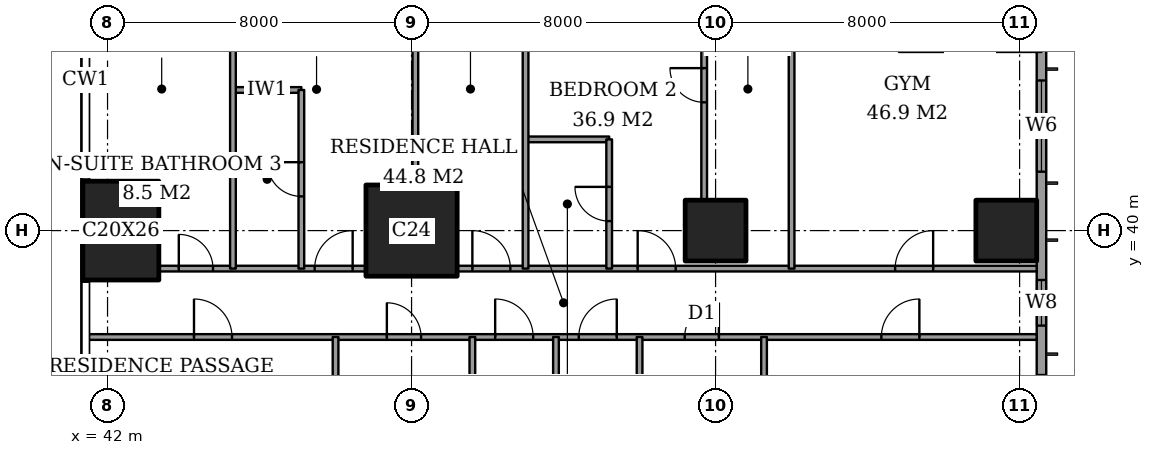
"""IFC4 building model, lengths in metres.
Left out: names, types, materials, properties, quantities, classifications, styles, units other than length and angle.
Written with IfcOpenShell. Run it as: python <this file> out.ifc"""

import sys

from ifc_helpers import new_model, si_unit, direction, frame, frame_2d, origin, origin_2d, place, context, subcontext, project, spatial, rectangle, extrude, element, fill, save


model = new_model("IFC4")
c1 = context("Model", 3, precision=1e-05, world=origin(), true_north=direction((0.0, 1.0)))
c2 = subcontext(c1, "Body", "Model", "MODEL_VIEW")
j1 = project(units=[si_unit("LENGTHUNIT", "METRE"), si_unit("PLANEANGLEUNIT", "RADIAN")], contexts=[c1])
p1 = place(None, origin())
s1 = spatial("IfcSite", under=j1, at=p1, CompositionType="ELEMENT")
p2 = place(p1, origin())
s2 = spatial("IfcBuilding", under=s1, at=p2, CompositionType="ELEMENT")
p3 = place(p2, frame((0.0, 0.0, 266.4)))
s3 = spatial("IfcBuildingStorey", under=s2, at=p3, CompositionType="ELEMENT", Elevation=266.4)
p4 = place(p3, frame((42.35, 40.0, 0.0), z_axis=(0.0, 0.0, 1.0), x_axis=(1.0, 0.0, 0.0)))
e1 = element("IfcColumn", 1, at=p4, inside=s3, PredefinedType="COLUMN", context=c2, shape_type="SweptSolid", body=[
    extrude(rectangle(XDim=2.0, YDim=2.6, at=origin_2d()), origin(), (0.0, 0.0, 1.0), 3.6),
])
p5 = place(p3, frame((50.0, 40.0, 0.0), z_axis=(0.0, 0.0, 1.0), x_axis=(1.0, 0.0, 0.0)))
e2 = element("IfcColumn", 2, at=p5, inside=s3, PredefinedType="COLUMN", context=c2, shape_type="SweptSolid", body=[
    extrude(rectangle(XDim=2.4, YDim=2.4, at=origin_2d()), origin(), (0.0, 0.0, 1.0), 3.6),
])
for number, where, z_axis, x_axis in (
    (3, (58.0, 40.0, 0.0), (0.0, 0.0, 1.0), (1.0, 0.0, 0.0)),
    (4, (65.65, 40.0, 0.0), (0.0, 0.0, 1.0), (1.0, 0.0, 0.0)),
):
    element("IfcColumn", number, at=place(p3, frame(where, z_axis=z_axis, x_axis=x_axis)), inside=s3, PredefinedType="COLUMN", context=c2, shape_type="SweptSolid", body=[
        extrude(rectangle(XDim=1.6, YDim=1.6, at=origin_2d()), origin(), (0.0, 0.0, 1.0), 3.6),
    ])
p6 = place(p3, frame((66.575, 3.175, 0.0), z_axis=(0.0, 0.0, 1.0), x_axis=(0.0, 1.0, 0.0)))
e5 = element("IfcWall", 5, at=p6, inside=s3, PredefinedType="SOLIDWALL", context=c2, shape_type="SweptSolid", body=[
    extrude(rectangle(XDim=41.65, YDim=0.25, at=frame_2d((20.825, 0.0))), origin(), (0.0, 0.0, 1.0), 3.6),
])
p7 = place(p6, frame((0.875, 0.0, 0.6)))
e6 = element("IfcOpeningElement", 6, at=p7, cuts=e5, PredefinedType="OPENING", context=c2, shape_type="SweptSolid", body=[
    extrude(rectangle(XDim=2.4, YDim=2.0, at=frame_2d((1.2, 1.0))), frame((0.0, 0.135, 0.0), z_axis=(0.0, -1.0, 0.0), x_axis=(1.0, 0.0, 0.0)), (0.0, 0.0, 1.0), 0.27),
])
p8 = place(p6, frame((6.0, 0.0, 0.6)))
e7 = element("IfcOpeningElement", 7, at=p8, cuts=e5, PredefinedType="OPENING", context=c2, shape_type="SweptSolid", body=[
    extrude(rectangle(XDim=1.2, YDim=2.0, at=frame_2d((0.6, 1.0))), frame((0.0, 0.135, 0.0), z_axis=(0.0, -1.0, 0.0), x_axis=(1.0, 0.0, 0.0)), (0.0, 0.0, 1.0), 0.27),
])
p9 = place(p6, frame((8.525, 0.0, 0.6)))
e8 = element("IfcOpeningElement", 8, at=p9, cuts=e5, PredefinedType="OPENING", context=c2, shape_type="SweptSolid", body=[
    extrude(rectangle(XDim=2.4, YDim=2.0, at=frame_2d((1.2, 1.0))), frame((0.0, 0.135, 0.0), z_axis=(0.0, -1.0, 0.0), x_axis=(1.0, 0.0, 0.0)), (0.0, 0.0, 1.0), 0.27),
])
p10 = place(p6, frame((15.625, 0.0, 0.6)))
e9 = element("IfcOpeningElement", 9, at=p10, cuts=e5, PredefinedType="OPENING", context=c2, shape_type="SweptSolid", body=[
    extrude(rectangle(XDim=2.4, YDim=2.0, at=frame_2d((1.2, 1.0))), frame((0.0, 0.135, 0.0), z_axis=(0.0, -1.0, 0.0), x_axis=(1.0, 0.0, 0.0)), (0.0, 0.0, 1.0), 0.27),
])
p11 = place(p6, frame((23.525, 0.0, 0.6)))
e10 = element("IfcOpeningElement", 10, at=p11, cuts=e5, PredefinedType="OPENING", context=c2, shape_type="SweptSolid", body=[
    extrude(rectangle(XDim=2.4, YDim=2.0, at=frame_2d((1.2, 1.0))), frame((0.0, 0.135, 0.0), z_axis=(0.0, -1.0, 0.0), x_axis=(1.0, 0.0, 0.0)), (0.0, 0.0, 1.0), 0.27),
])
p12 = place(p6, frame((30.625, 0.0, 0.6)))
e11 = element("IfcOpeningElement", 11, at=p12, cuts=e5, PredefinedType="OPENING", context=c2, shape_type="SweptSolid", body=[
    extrude(rectangle(XDim=2.4, YDim=2.0, at=frame_2d((1.2, 1.0))), frame((0.0, 0.135, 0.0), z_axis=(0.0, -1.0, 0.0), x_axis=(1.0, 0.0, 0.0)), (0.0, 0.0, 1.0), 0.27),
])
p13 = place(p6, frame((34.325, 0.0, 0.6)))
e12 = element("IfcOpeningElement", 12, at=p13, cuts=e5, PredefinedType="OPENING", context=c2, shape_type="SweptSolid", body=[
    extrude(rectangle(XDim=1.2, YDim=2.0, at=frame_2d((0.6, 1.0))), frame((0.0, 0.135, 0.0), z_axis=(0.0, -1.0, 0.0), x_axis=(1.0, 0.0, 0.0)), (0.0, 0.0, 1.0), 0.27),
])
p14 = place(p6, frame((38.375, 0.0, 0.6)))
e13 = element("IfcOpeningElement", 13, at=p14, cuts=e5, PredefinedType="OPENING", context=c2, shape_type="SweptSolid", body=[
    extrude(rectangle(XDim=2.4, YDim=2.0, at=frame_2d((1.2, 1.0))), frame((0.0, 0.135, 0.0), z_axis=(0.0, -1.0, 0.0), x_axis=(1.0, 0.0, 0.0)), (0.0, 0.0, 1.0), 0.27),
])
p15 = place(p3, frame((41.439, 37.2, 0.0), z_axis=(0.0, 0.0, 1.0), x_axis=(1.0, 0.0, 0.0)))
e14 = element("IfcWall", 14, at=p15, inside=s3, PredefinedType="PARTITIONING", context=c2, shape_type="SweptSolid", body=[
    extrude(rectangle(XDim=25.011, YDim=0.15, at=frame_2d((12.505, 0.0))), origin(), (0.0, 0.0, 1.0), 3.35),
])
p16 = place(p15, frame((10.761, 0.0, 0.0)))
e15 = element("IfcOpeningElement", 15, at=p16, cuts=e14, PredefinedType="OPENING", context=c2, shape_type="SweptSolid", body=[
    extrude(rectangle(XDim=1.0, YDim=2.1, at=frame_2d((0.5, 1.05))), frame((0.0, 0.085, 0.0), z_axis=(0.0, -1.0, 0.0), x_axis=(1.0, 0.0, 0.0)), (0.0, 0.0, 1.0), 0.17),
])
p17 = place(p15, frame((20.924, 0.0, 0.0)))
e16 = element("IfcOpeningElement", 16, at=p17, cuts=e14, PredefinedType="OPENING", context=c2, shape_type="SweptSolid", body=[
    extrude(rectangle(XDim=1.0, YDim=2.1, at=frame_2d((0.5, 1.05))), frame((0.0, 0.085, 0.0), z_axis=(0.0, -1.0, 0.0), x_axis=(1.0, 0.0, 0.0)), (0.0, 0.0, 1.0), 0.17),
])
p18 = place(p15, frame((15.749, 0.0, 0.0)))
e17 = element("IfcOpeningElement", 17, at=p18, cuts=e14, PredefinedType="OPENING", context=c2, shape_type="SweptSolid", body=[
    extrude(rectangle(XDim=0.9, YDim=2.1, at=frame_2d((0.45, 1.05))), frame((0.0, 0.085, 0.0), z_axis=(0.0, -1.0, 0.0), x_axis=(1.0, 0.0, 0.0)), (0.0, 0.0, 1.0), 0.17),
])
p19 = place(p15, frame((12.961, 0.0, 0.0)))
e18 = element("IfcOpeningElement", 18, at=p19, cuts=e14, PredefinedType="OPENING", context=c2, shape_type="SweptSolid", body=[
    extrude(rectangle(XDim=1.0, YDim=2.1, at=frame_2d((0.5, 1.05))), frame((0.0, 0.085, 0.0), z_axis=(0.0, -1.0, 0.0), x_axis=(1.0, 0.0, 0.0)), (0.0, 0.0, 1.0), 0.17),
])
p20 = place(p15, frame((7.911, 0.0, 0.0)))
e19 = element("IfcOpeningElement", 19, at=p20, cuts=e14, PredefinedType="OPENING", context=c2, shape_type="SweptSolid", body=[
    extrude(rectangle(XDim=0.9, YDim=2.1, at=frame_2d((0.45, 1.05))), frame((0.0, 0.085, 0.0), z_axis=(0.0, -1.0, 0.0), x_axis=(1.0, 0.0, 0.0)), (0.0, 0.0, 1.0), 0.17),
])
p21 = place(p15, frame((2.836, 0.0, 0.0)))
e20 = element("IfcOpeningElement", 20, at=p21, cuts=e14, PredefinedType="OPENING", context=c2, shape_type="SweptSolid", body=[
    extrude(rectangle(XDim=1.0, YDim=2.1, at=frame_2d((0.5, 1.05))), frame((0.0, 0.085, 0.0), z_axis=(0.0, -1.0, 0.0), x_axis=(1.0, 0.0, 0.0)), (0.0, 0.0, 1.0), 0.17),
])
p22 = place(p3, frame((43.35, 39.0, 0.0), z_axis=(0.0, 0.0, 1.0), x_axis=(1.0, 0.0, 0.0)))
e21 = element("IfcWall", 21, at=p22, inside=s3, PredefinedType="PARTITIONING", context=c2, shape_type="SweptSolid", body=[
    extrude(rectangle(XDim=5.45, YDim=0.15, at=frame_2d((2.725, 0.0))), origin(), (0.0, 0.0, 1.0), 3.35),
])
p23 = place(p22, frame((4.1, 0.0, 0.0)))
e22 = element("IfcOpeningElement", 22, at=p23, cuts=e21, PredefinedType="OPENING", context=c2, shape_type="SweptSolid", body=[
    extrude(rectangle(XDim=1.0, YDim=2.1, at=frame_2d((0.5, 1.05))), frame((0.0, 0.085, 0.0), z_axis=(0.0, -1.0, 0.0), x_axis=(1.0, 0.0, 0.0)), (0.0, 0.0, 1.0), 0.17),
])
p24 = place(p22, frame((0.525, 0.0, 0.0)))
e23 = element("IfcOpeningElement", 23, at=p24, cuts=e21, PredefinedType="OPENING", context=c2, shape_type="SweptSolid", body=[
    extrude(rectangle(XDim=0.9, YDim=2.1, at=frame_2d((0.45, 1.05))), frame((0.0, 0.085, 0.0), z_axis=(0.0, -1.0, 0.0), x_axis=(1.0, 0.0, 0.0)), (0.0, 0.0, 1.0), 0.17),
])
p25 = place(p3, frame((51.2, 39.0, 0.0), z_axis=(0.0, 0.0, 1.0), x_axis=(1.0, 0.0, 0.0)))
e24 = element("IfcWall", 24, at=p25, inside=s3, PredefinedType="PARTITIONING", context=c2, shape_type="SweptSolid", body=[
    extrude(rectangle(XDim=15.25, YDim=0.15, at=frame_2d((7.625, 0.0))), origin(), (0.0, 0.0, 1.0), 3.35),
])
p26 = place(p25, frame((11.525, 0.0, 0.0)))
e25 = element("IfcOpeningElement", 25, at=p26, cuts=e24, PredefinedType="OPENING", context=c2, shape_type="SweptSolid", body=[
    extrude(rectangle(XDim=1.0, YDim=2.1, at=frame_2d((0.5, 1.05))), frame((0.0, 0.085, 0.0), z_axis=(0.0, -1.0, 0.0), x_axis=(1.0, 0.0, 0.0)), (0.0, 0.0, 1.0), 0.17),
])
p27 = place(p25, frame((4.75, 0.0, 0.0)))
e26 = element("IfcOpeningElement", 26, at=p27, cuts=e24, PredefinedType="OPENING", context=c2, shape_type="SweptSolid", body=[
    extrude(rectangle(XDim=1.0, YDim=2.1, at=frame_2d((0.5, 1.05))), frame((0.0, 0.085, 0.0), z_axis=(0.0, -1.0, 0.0), x_axis=(1.0, 0.0, 0.0)), (0.0, 0.0, 1.0), 0.17),
])
p28 = place(p25, frame((0.4, 0.0, 0.0)))
e27 = element("IfcOpeningElement", 27, at=p28, cuts=e24, PredefinedType="OPENING", context=c2, shape_type="SweptSolid", body=[
    extrude(rectangle(XDim=1.0, YDim=2.1, at=frame_2d((0.5, 1.05))), frame((0.0, 0.085, 0.0), z_axis=(0.0, -1.0, 0.0), x_axis=(1.0, 0.0, 0.0)), (0.0, 0.0, 1.0), 0.17),
])
p29 = place(p3, frame((53.0, 42.4, 0.0), z_axis=(0.0, 0.0, 1.0), x_axis=(1.0, 0.0, 0.0)))
e28 = element("IfcWall", 28, at=p29, inside=s3, PredefinedType="PARTITIONING", context=c2, shape_type="SweptSolid", body=[
    extrude(rectangle(XDim=2.2, YDim=0.15, at=frame_2d((1.1, 0.0))), origin(), (0.0, 0.0, 1.0), 3.35),
])
p30 = place(p3, frame((45.3, 43.7, 0.0), z_axis=(0.0, 0.0, 1.0), x_axis=(1.0, 0.0, 0.0)))
e29 = element("IfcWall", 29, at=p30, inside=s3, PredefinedType="PARTITIONING", context=c2, shape_type="SweptSolid", body=[
    extrude(rectangle(XDim=1.8, YDim=0.15, at=frame_2d((0.9, 0.0))), origin(), (0.0, 0.0, 1.0), 3.35),
])
p31 = place(p3, frame((45.3, 39.0, 0.0), z_axis=(0.0, 0.0, 1.0), x_axis=(0.0, 1.0, 0.0)))
e30 = element("IfcWall", 30, at=p31, inside=s3, PredefinedType="PARTITIONING", context=c2, shape_type="SweptSolid", body=[
    extrude(rectangle(XDim=9.45, YDim=0.15, at=frame_2d((4.725, 0.0))), origin(), (0.0, 0.0, 1.0), 3.35),
])
p32 = place(p3, frame((47.1, 39.0, 0.0), z_axis=(0.0, 0.0, 1.0), x_axis=(0.0, 1.0, 0.0)))
e31 = element("IfcWall", 31, at=p32, inside=s3, PredefinedType="PARTITIONING", context=c2, shape_type="SweptSolid", body=[
    extrude(rectangle(XDim=4.7, YDim=0.15, at=frame_2d((2.35, 0.0))), origin(), (0.0, 0.0, 1.0), 3.35),
])
p33 = place(p32, frame((1.9, 0.0, 0.0)))
e32 = element("IfcOpeningElement", 32, at=p33, cuts=e31, PredefinedType="OPENING", context=c2, shape_type="SweptSolid", body=[
    extrude(rectangle(XDim=0.9, YDim=2.1, at=frame_2d((0.45, 1.05))), frame((0.0, 0.085, 0.0), z_axis=(0.0, -1.0, 0.0), x_axis=(1.0, 0.0, 0.0)), (0.0, 0.0, 1.0), 0.17),
])
p34 = place(p3, frame((48.0, 28.0, 0.0), z_axis=(0.0, 0.0, 1.0), x_axis=(0.0, 1.0, 0.0)))
e33 = element("IfcWall", 33, at=p34, inside=s3, PredefinedType="PARTITIONING", context=c2, shape_type="SweptSolid", body=[
    extrude(rectangle(XDim=9.2, YDim=0.15, at=frame_2d((4.6, 0.0))), origin(), (0.0, 0.0, 1.0), 3.35),
])
p35 = place(p34, frame((0.5, 0.0, 0.0)))
e34 = element("IfcOpeningElement", 34, at=p35, cuts=e33, PredefinedType="OPENING", context=c2, shape_type="SweptSolid", body=[
    extrude(rectangle(XDim=1.0, YDim=2.1, at=frame_2d((0.5, 1.05))), frame((0.0, 0.085, 0.0), z_axis=(0.0, -1.0, 0.0), x_axis=(1.0, 0.0, 0.0)), (0.0, 0.0, 1.0), 0.17),
])
p36 = place(p3, frame((50.1, 41.2, 0.0), z_axis=(0.0, 0.0, 1.0), x_axis=(0.0, 1.0, 0.0)))
e35 = element("IfcWall", 35, at=p36, inside=s3, PredefinedType="PARTITIONING", context=c2, shape_type="SweptSolid", body=[
    extrude(rectangle(XDim=5.65, YDim=0.15, at=frame_2d((2.825, 0.0))), origin(), (0.0, 0.0, 1.0), 3.35),
])
p37 = place(p3, frame((51.6, 30.0, 0.0), z_axis=(0.0, 0.0, 1.0), x_axis=(0.0, 1.0, 0.0)))
e36 = element("IfcWall", 36, at=p37, inside=s3, PredefinedType="PARTITIONING", context=c2, shape_type="SweptSolid", body=[
    extrude(rectangle(XDim=7.2, YDim=0.15, at=frame_2d((3.6, 0.0))), origin(), (0.0, 0.0, 1.0), 3.35),
])
p38 = place(p3, frame((53.0, 39.0, 0.0), z_axis=(0.0, 0.0, 1.0), x_axis=(0.0, 1.0, 0.0)))
e37 = element("IfcWall", 37, at=p38, inside=s3, PredefinedType="PARTITIONING", context=c2, shape_type="SweptSolid", body=[
    extrude(rectangle(XDim=9.45, YDim=0.15, at=frame_2d((4.725, 0.0))), origin(), (0.0, 0.0, 1.0), 3.35),
])
p39 = place(p3, frame((53.8, 30.0, 0.0), z_axis=(0.0, 0.0, 1.0), x_axis=(0.0, 1.0, 0.0)))
e38 = element("IfcWall", 38, at=p39, inside=s3, PredefinedType="PARTITIONING", context=c2, shape_type="SweptSolid", body=[
    extrude(rectangle(XDim=7.2, YDim=0.15, at=frame_2d((3.6, 0.0))), origin(), (0.0, 0.0, 1.0), 3.35),
])
p40 = place(p3, frame((55.2, 39.0, 0.0), z_axis=(0.0, 0.0, 1.0), x_axis=(0.0, 1.0, 0.0)))
e39 = element("IfcWall", 39, at=p40, inside=s3, PredefinedType="PARTITIONING", context=c2, shape_type="SweptSolid", body=[
    extrude(rectangle(XDim=3.4, YDim=0.15, at=frame_2d((1.7, 0.0))), origin(), (0.0, 0.0, 1.0), 3.35),
])
p41 = place(p40, frame((1.25, 0.0, 0.0)))
e40 = element("IfcOpeningElement", 40, at=p41, cuts=e39, PredefinedType="OPENING", context=c2, shape_type="SweptSolid", body=[
    extrude(rectangle(XDim=0.9, YDim=2.1, at=frame_2d((0.45, 1.05))), frame((0.0, 0.085, 0.0), z_axis=(0.0, -1.0, 0.0), x_axis=(1.0, 0.0, 0.0)), (0.0, 0.0, 1.0), 0.17),
])
p42 = place(p3, frame((56.0, 28.0, 0.0), z_axis=(0.0, 0.0, 1.0), x_axis=(0.0, 1.0, 0.0)))
e41 = element("IfcWall", 41, at=p42, inside=s3, PredefinedType="PARTITIONING", context=c2, shape_type="SweptSolid", body=[
    extrude(rectangle(XDim=9.2, YDim=0.15, at=frame_2d((4.6, 0.0))), origin(), (0.0, 0.0, 1.0), 3.35),
])
p43 = place(p42, frame((0.5, 0.0, 0.0)))
e42 = element("IfcOpeningElement", 42, at=p43, cuts=e41, PredefinedType="OPENING", context=c2, shape_type="SweptSolid", body=[
    extrude(rectangle(XDim=1.0, YDim=2.1, at=frame_2d((0.5, 1.05))), frame((0.0, 0.085, 0.0), z_axis=(0.0, -1.0, 0.0), x_axis=(1.0, 0.0, 0.0)), (0.0, 0.0, 1.0), 0.17),
])
p44 = place(p3, frame((57.7, 40.8, 0.0), z_axis=(0.0, 0.0, 1.0), x_axis=(0.0, 1.0, 0.0)))
e43 = element("IfcWall", 43, at=p44, inside=s3, PredefinedType="PARTITIONING", context=c2, shape_type="SweptSolid", body=[
    extrude(rectangle(XDim=6.05, YDim=0.15, at=frame_2d((3.025, 0.0))), origin(), (0.0, 0.0, 1.0), 3.35),
])
p45 = place(p44, frame((2.575, 0.0, 0.0)))
e44 = element("IfcOpeningElement", 44, at=p45, cuts=e43, PredefinedType="OPENING", context=c2, shape_type="SweptSolid", body=[
    extrude(rectangle(XDim=0.9, YDim=2.1, at=frame_2d((0.45, 1.05))), frame((0.0, 0.085, 0.0), z_axis=(0.0, -1.0, 0.0), x_axis=(1.0, 0.0, 0.0)), (0.0, 0.0, 1.0), 0.17),
])
p46 = place(p3, frame((59.275, 33.2, 0.0), z_axis=(0.0, 0.0, 1.0), x_axis=(0.0, 1.0, 0.0)))
e45 = element("IfcWall", 45, at=p46, inside=s3, PredefinedType="PARTITIONING", context=c2, shape_type="SweptSolid", body=[
    extrude(rectangle(XDim=4.0, YDim=0.15, at=frame_2d((2.0, 0.0))), origin(), (0.0, 0.0, 1.0), 3.35),
])
p47 = place(p3, frame((60.0, 39.0, 0.0), z_axis=(0.0, 0.0, 1.0), x_axis=(0.0, 1.0, 0.0)))
e46 = element("IfcWall", 46, at=p47, inside=s3, PredefinedType="PARTITIONING", context=c2, shape_type="SweptSolid", body=[
    extrude(rectangle(XDim=9.45, YDim=0.15, at=frame_2d((4.725, 0.0))), origin(), (0.0, 0.0, 1.0), 3.35),
])
p48 = place(p13, origin())
e47 = element("IfcWindow", 47, at=p48, inside=s3, PartitioningType="SINGLE_PANEL", PredefinedType="WINDOW", context=c2, shape_type="SweptSolid", body=[
    extrude(rectangle(XDim=1.2, YDim=2.0, at=frame_2d((0.6, 1.0))), frame((0.0, 0.03, 0.0), z_axis=(0.0, -1.0, 0.0), x_axis=(1.0, 0.0, 0.0)), (0.0, 0.0, 1.0), 0.06),
])
fill(e12, e47)
p49 = place(p14, origin())
e48 = element("IfcWindow", 48, at=p49, inside=s3, PartitioningType="SINGLE_PANEL", PredefinedType="WINDOW", context=c2, shape_type="SweptSolid", body=[
    extrude(rectangle(XDim=2.4, YDim=2.0, at=frame_2d((1.2, 1.0))), frame((0.0, 0.03, 0.0), z_axis=(0.0, -1.0, 0.0), x_axis=(1.0, 0.0, 0.0)), (0.0, 0.0, 1.0), 0.06),
])
fill(e13, e48)
p50 = place(p26, origin())
e49 = element("IfcDoor", 49, at=p50, inside=s3, OperationType="SINGLE_SWING_LEFT", PredefinedType="DOOR", context=c2, shape_type="SweptSolid", body=[
    extrude(rectangle(XDim=1.0, YDim=2.1, at=frame_2d((0.5, 1.05))), frame((0.0, 0.025, 0.0), z_axis=(0.0, -1.0, 0.0), x_axis=(1.0, 0.0, 0.0)), (0.0, 0.0, 1.0), 0.05),
])
fill(e25, e49)
p51 = place(p45, origin())
e50 = element("IfcDoor", 50, at=p51, inside=s3, OperationType="SINGLE_SWING_LEFT", PredefinedType="DOOR", context=c2, shape_type="SweptSolid", body=[
    extrude(rectangle(XDim=0.9, YDim=2.1, at=frame_2d((0.45, 1.05))), frame((0.0, 0.025, 0.0), z_axis=(0.0, -1.0, 0.0), x_axis=(1.0, 0.0, 0.0)), (0.0, 0.0, 1.0), 0.05),
])
fill(e44, e50)
p52 = place(p41, origin())
e51 = element("IfcDoor", 51, at=p52, inside=s3, OperationType="SINGLE_SWING_LEFT", PredefinedType="DOOR", context=c2, shape_type="SweptSolid", body=[
    extrude(rectangle(XDim=0.9, YDim=2.1, at=frame_2d((0.45, 1.05))), frame((0.0, 0.025, 0.0), z_axis=(0.0, -1.0, 0.0), x_axis=(1.0, 0.0, 0.0)), (0.0, 0.0, 1.0), 0.05),
])
fill(e40, e51)
p53 = place(p27, origin())
e52 = element("IfcDoor", 52, at=p53, inside=s3, OperationType="SINGLE_SWING_RIGHT", PredefinedType="DOOR", context=c2, shape_type="SweptSolid", body=[
    extrude(rectangle(XDim=1.0, YDim=2.1, at=frame_2d((0.5, 1.05))), frame((0.0, 0.025, 0.0), z_axis=(0.0, -1.0, 0.0), x_axis=(1.0, 0.0, 0.0)), (0.0, 0.0, 1.0), 0.05),
])
fill(e26, e52)
p54 = place(p28, origin())
e53 = element("IfcDoor", 53, at=p54, inside=s3, OperationType="SINGLE_SWING_RIGHT", PredefinedType="DOOR", context=c2, shape_type="SweptSolid", body=[
    extrude(rectangle(XDim=1.0, YDim=2.1, at=frame_2d((0.5, 1.05))), frame((0.0, 0.025, 0.0), z_axis=(0.0, -1.0, 0.0), x_axis=(1.0, 0.0, 0.0)), (0.0, 0.0, 1.0), 0.05),
])
fill(e27, e53)
p55 = place(p33, origin())
e54 = element("IfcDoor", 54, at=p55, inside=s3, OperationType="SINGLE_SWING_LEFT", PredefinedType="DOOR", context=c2, shape_type="SweptSolid", body=[
    extrude(rectangle(XDim=0.9, YDim=2.1, at=frame_2d((0.45, 1.05))), frame((0.0, 0.025, 0.0), z_axis=(0.0, -1.0, 0.0), x_axis=(1.0, 0.0, 0.0)), (0.0, 0.0, 1.0), 0.05),
])
fill(e32, e54)
p56 = place(p23, origin())
e55 = element("IfcDoor", 55, at=p56, inside=s3, OperationType="SINGLE_SWING_LEFT", PredefinedType="DOOR", context=c2, shape_type="SweptSolid", body=[
    extrude(rectangle(XDim=1.0, YDim=2.1, at=frame_2d((0.5, 1.05))), frame((0.0, 0.025, 0.0), z_axis=(0.0, -1.0, 0.0), x_axis=(1.0, 0.0, 0.0)), (0.0, 0.0, 1.0), 0.05),
])
fill(e22, e55)
p57 = place(p24, origin())
e56 = element("IfcDoor", 56, at=p57, inside=s3, OperationType="SINGLE_SWING_RIGHT", PredefinedType="DOOR", context=c2, shape_type="SweptSolid", body=[
    extrude(rectangle(XDim=0.9, YDim=2.1, at=frame_2d((0.45, 1.05))), frame((0.0, 0.025, 0.0), z_axis=(0.0, -1.0, 0.0), x_axis=(1.0, 0.0, 0.0)), (0.0, 0.0, 1.0), 0.05),
])
fill(e23, e56)
p58 = place(p16, origin())
e57 = element("IfcDoor", 57, at=p58, inside=s3, OperationType="SINGLE_SWING_RIGHT", PredefinedType="DOOR", context=c2, shape_type="SweptSolid", body=[
    extrude(rectangle(XDim=1.0, YDim=2.1, at=frame_2d((0.5, 1.05))), frame((0.0, 0.025, 0.0), z_axis=(0.0, -1.0, 0.0), x_axis=(1.0, 0.0, 0.0)), (0.0, 0.0, 1.0), 0.05),
])
fill(e15, e57)
p59 = place(p17, origin())
e58 = element("IfcDoor", 58, at=p59, inside=s3, OperationType="SINGLE_SWING_LEFT", PredefinedType="DOOR", context=c2, shape_type="SweptSolid", body=[
    extrude(rectangle(XDim=1.0, YDim=2.1, at=frame_2d((0.5, 1.05))), frame((0.0, 0.025, 0.0), z_axis=(0.0, -1.0, 0.0), x_axis=(1.0, 0.0, 0.0)), (0.0, 0.0, 1.0), 0.05),
])
fill(e16, e58)
p60 = place(p18, origin())
e59 = element("IfcDoor", 59, at=p60, inside=s3, OperationType="SINGLE_SWING_LEFT", PredefinedType="DOOR", context=c2, shape_type="SweptSolid", body=[
    extrude(rectangle(XDim=0.9, YDim=2.1, at=frame_2d((0.45, 1.05))), frame((0.0, 0.025, 0.0), z_axis=(0.0, -1.0, 0.0), x_axis=(1.0, 0.0, 0.0)), (0.0, 0.0, 1.0), 0.05),
])
fill(e17, e59)
p61 = place(p19, origin())
e60 = element("IfcDoor", 60, at=p61, inside=s3, OperationType="SINGLE_SWING_LEFT", PredefinedType="DOOR", context=c2, shape_type="SweptSolid", body=[
    extrude(rectangle(XDim=1.0, YDim=2.1, at=frame_2d((0.5, 1.05))), frame((0.0, 0.025, 0.0), z_axis=(0.0, -1.0, 0.0), x_axis=(1.0, 0.0, 0.0)), (0.0, 0.0, 1.0), 0.05),
])
fill(e18, e60)
p62 = place(p20, origin())
e61 = element("IfcDoor", 61, at=p62, inside=s3, OperationType="SINGLE_SWING_RIGHT", PredefinedType="DOOR", context=c2, shape_type="SweptSolid", body=[
    extrude(rectangle(XDim=0.9, YDim=2.1, at=frame_2d((0.45, 1.05))), frame((0.0, 0.025, 0.0), z_axis=(0.0, -1.0, 0.0), x_axis=(1.0, 0.0, 0.0)), (0.0, 0.0, 1.0), 0.05),
])
fill(e19, e61)
p63 = place(p21, origin())
e62 = element("IfcDoor", 62, at=p63, inside=s3, OperationType="SINGLE_SWING_RIGHT", PredefinedType="DOOR", context=c2, shape_type="SweptSolid", body=[
    extrude(rectangle(XDim=1.0, YDim=2.1, at=frame_2d((0.5, 1.05))), frame((0.0, 0.025, 0.0), z_axis=(0.0, -1.0, 0.0), x_axis=(1.0, 0.0, 0.0)), (0.0, 0.0, 1.0), 0.05),
])
fill(e20, e62)
save(model, sys.argv[1])
